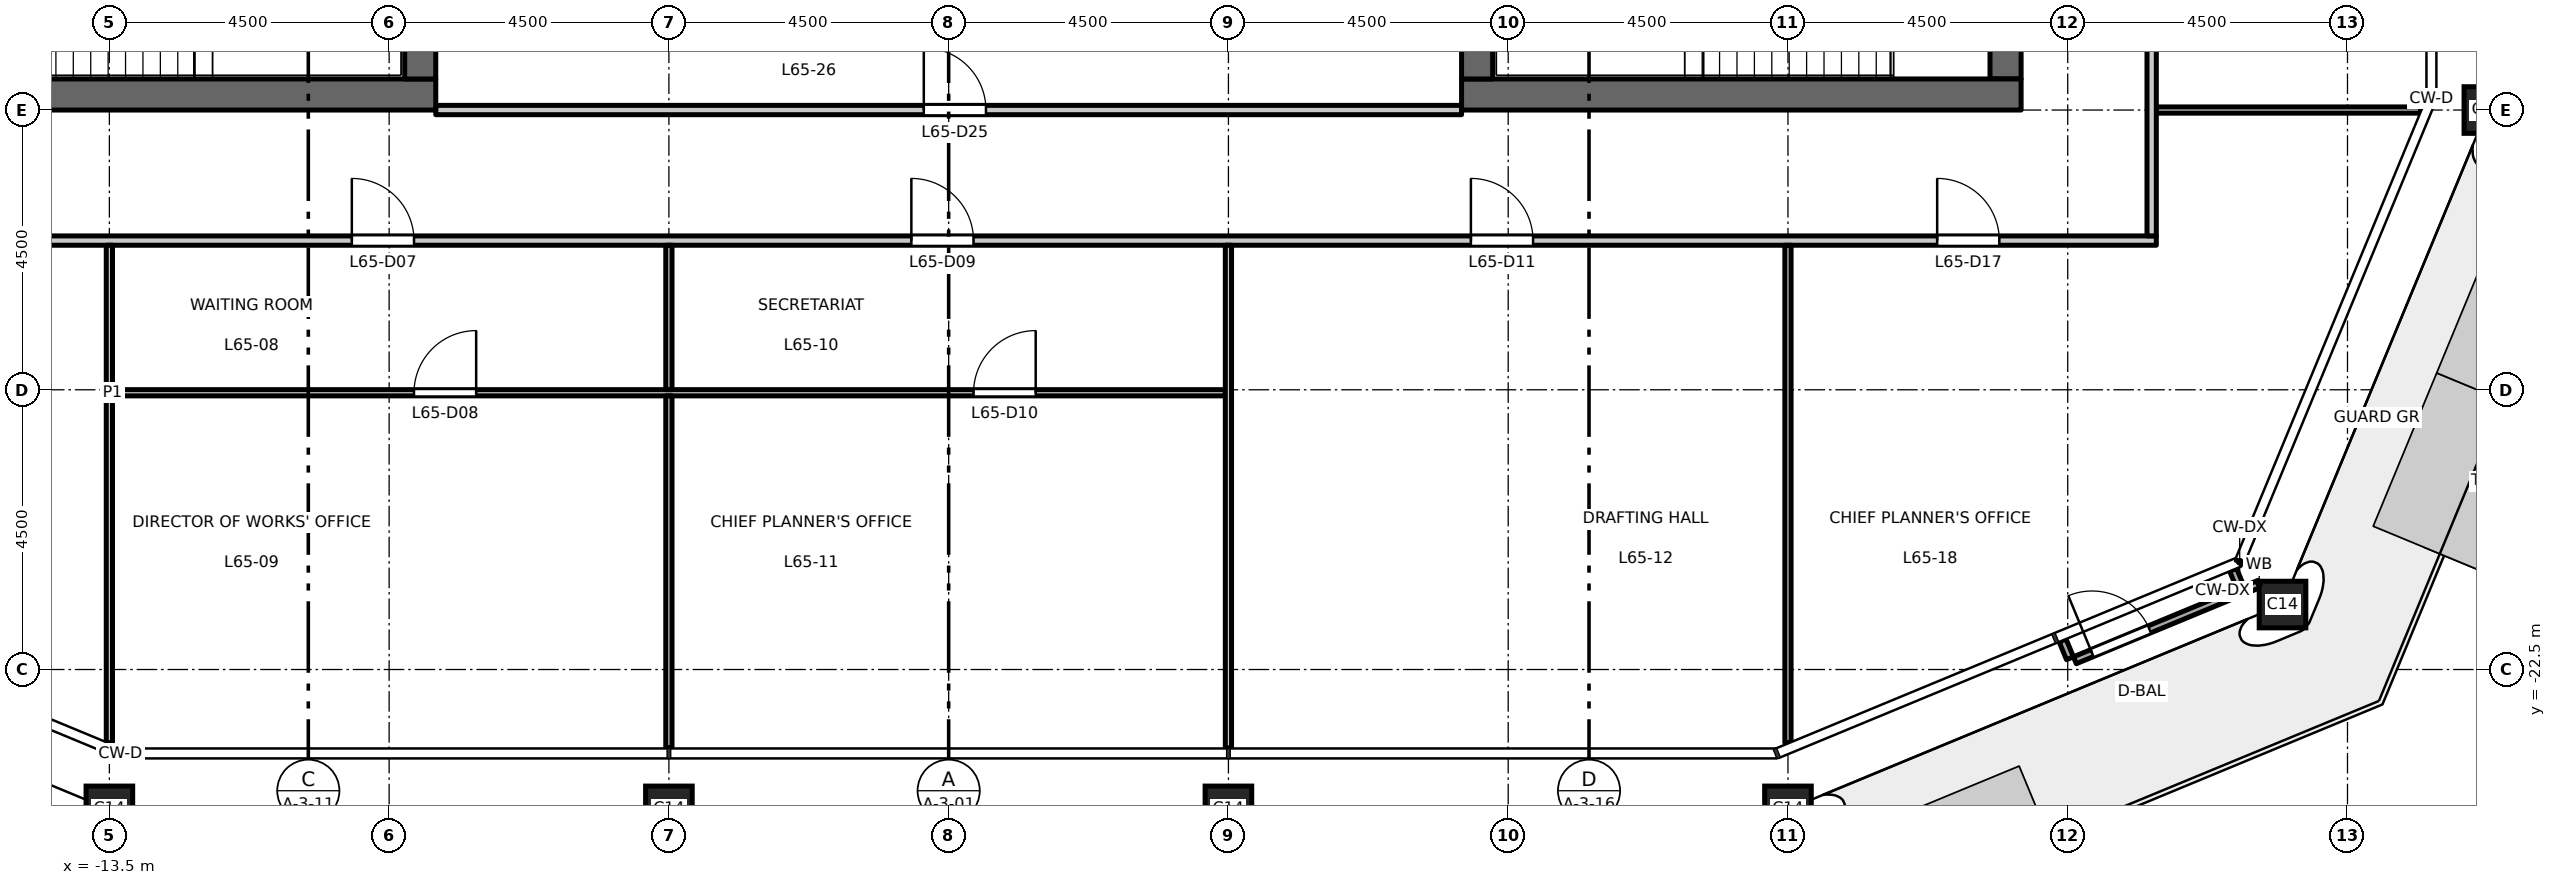
"""IFC4 building model, lengths in metres.
Left out: names, types, materials, properties, quantities, classifications, styles, units other than length and angle.
Written with IfcOpenShell. Run it as: python <this file> out.ifc"""

import sys

from ifc_helpers import new_model, si_unit, direction, frame, frame_2d, origin, origin_2d, place, context, subcontext, project, spatial, rectangle, hollow_rectangle, extrude, element, fill, save


model = new_model("IFC4")
c1 = context("Model", 3, precision=1e-05, world=origin(), true_north=direction((0.0, 1.0)))
c2 = subcontext(c1, "Body", "Model", "MODEL_VIEW")
j1 = project(units=[si_unit("LENGTHUNIT", "METRE"), si_unit("PLANEANGLEUNIT", "RADIAN")], contexts=[c1])
p1 = place(None, origin())
s1 = spatial("IfcSite", under=j1, at=p1, CompositionType="ELEMENT")
p2 = place(p1, origin())
s2 = spatial("IfcBuilding", under=s1, at=p2, CompositionType="ELEMENT")
p3 = place(p2, frame((0.0, 0.0, 303.2)))
s3 = spatial("IfcBuildingStorey", under=s2, at=p3, CompositionType="ELEMENT", Elevation=303.2)
for number, where, z_axis, x_axis in (
    (1, (-13.5, -24.75, 0.0), (0.0, 0.0, 1.0), (1.0, 0.0, 0.0)),
    (2, (-4.5, -24.75, 0.0), (0.0, 0.0, 1.0), (1.0, 0.0, 0.0)),
    (3, (4.5, -24.75, 0.0), (0.0, 0.0, 1.0), (1.0, 0.0, 0.0)),
    (4, (13.5, -24.75, 0.0), (0.0, 0.0, 1.0), (1.0, 0.0, 0.0)),
    (5, (21.455, -21.455, 0.0), (0.0, 0.0, 1.0), (1.0, 0.0, 0.0)),
    (6, (24.75, -13.5, 0.0), (0.0, 0.0, 1.0), (1.0, 0.0, 0.0)),
):
    element("IfcColumn", number, at=place(p3, frame(where, z_axis=z_axis, x_axis=x_axis)), inside=s3, PredefinedType="COLUMN", context=c2, shape_type="SweptSolid", body=[
        extrude(hollow_rectangle(XDim=0.75, YDim=0.75, WallThickness=0.04, at=origin_2d()), origin(), (0.0, 0.0, 1.0), 4.5),
    ])
p4 = place(p3, frame((-8.25, -13.25, 0.0), z_axis=(0.0, 0.0, 1.0), x_axis=(-1.0, 0.0, 0.0)))
e7 = element("IfcWall", 7, at=p4, inside=s3, PredefinedType="SHEAR", context=c2, shape_type="SweptSolid", body=[
    extrude(rectangle(XDim=9.0, YDim=0.5, at=frame_2d((4.5, 0.0))), origin(), (0.0, 0.0, 1.0), 4.35),
])
p5 = place(p3, frame((-8.5, -13.0, 0.0), z_axis=(0.0, 0.0, 1.0), x_axis=(0.0, 1.0, 0.0)))
e8 = element("IfcWall", 8, at=p5, inside=s3, PredefinedType="SHEAR", context=c2, shape_type="SweptSolid", body=[
    extrude(rectangle(XDim=26.0, YDim=0.5, at=frame_2d((13.0, 0.0))), origin(), (0.0, 0.0, 1.0), 4.35),
])
p6 = place(p3, frame((17.0, -13.0, 0.0), z_axis=(0.0, 0.0, 1.0), x_axis=(0.0, 1.0, 0.0)))
e9 = element("IfcWall", 9, at=p6, inside=s3, PredefinedType="SHEAR", context=c2, shape_type="SweptSolid", body=[
    extrude(rectangle(XDim=26.0, YDim=0.5, at=frame_2d((13.0, 0.0))), origin(), (0.0, 0.0, 1.0), 4.35),
])
p7 = place(p6, frame((16.825, 0.0, 0.0)))
e10 = element("IfcOpeningElement", 10, at=p7, cuts=e9, PredefinedType="OPENING", context=c2, shape_type="SweptSolid", body=[
    extrude(rectangle(XDim=1.8, YDim=2.1, at=frame_2d((0.9, 1.05))), frame((0.0, 0.26, 0.0), z_axis=(0.0, -1.0, 0.0), x_axis=(1.0, 0.0, 0.0)), (0.0, 0.0, 1.0), 0.52),
])
p8 = place(p6, frame((7.375, 0.0, 0.0)))
e11 = element("IfcOpeningElement", 11, at=p8, cuts=e9, PredefinedType="OPENING", context=c2, shape_type="SweptSolid", body=[
    extrude(rectangle(XDim=1.8, YDim=2.1, at=frame_2d((0.9, 1.05))), frame((0.0, 0.26, 0.0), z_axis=(0.0, -1.0, 0.0), x_axis=(1.0, 0.0, 0.0)), (0.0, 0.0, 1.0), 0.52),
])
p9 = place(p3, frame((8.25, -13.25, 0.0), z_axis=(0.0, 0.0, 1.0), x_axis=(1.0, 0.0, 0.0)))
e12 = element("IfcWall", 12, at=p9, inside=s3, PredefinedType="SHEAR", context=c2, shape_type="SweptSolid", body=[
    extrude(rectangle(XDim=9.0, YDim=0.5, at=frame_2d((4.5, 0.0))), origin(), (0.0, 0.0, 1.0), 4.35),
])
p10 = place(p3, frame((8.5, -13.0, 0.0), z_axis=(0.0, 0.0, 1.0), x_axis=(0.0, 1.0, 0.0)))
e13 = element("IfcWall", 13, at=p10, inside=s3, PredefinedType="SHEAR", context=c2, shape_type="SweptSolid", body=[
    extrude(rectangle(XDim=26.0, YDim=0.5, at=frame_2d((13.0, 0.0))), origin(), (0.0, 0.0, 1.0), 4.35),
])
p11 = place(p3, frame((17.917, -22.033, 0.0), z_axis=(0.0, 0.0, 1.0), x_axis=(0.382769136873, -0.923844027884, 0.0)))
e14 = element("IfcWall", 14, at=p11, inside=s3, PredefinedType="STANDARD", context=c2, shape_type="SweptSolid", body=[
    extrude(rectangle(XDim=0.31, YDim=0.12, at=frame_2d((0.155, 0.0))), origin(), (0.0, 0.0, 1.0), 4.35),
])
p12 = place(p3, frame((20.66, -20.896, 0.0), z_axis=(0.0, 0.0, 1.0), x_axis=(0.382490814953, -0.923959293734, 0.0)))
e15 = element("IfcWall", 15, at=p12, inside=s3, PredefinedType="STANDARD", context=c2, shape_type="SweptSolid", body=[
    extrude(rectangle(XDim=0.31, YDim=0.12, at=frame_2d((0.155, 0.0))), origin(), (0.0, 0.0, 1.0), 4.35),
])
p13 = place(p3, frame((18.115, -22.352, 0.0), z_axis=(0.0, 0.0, 1.0), x_axis=(0.923880552517, 0.382680969843, 0.0)))
e16 = element("IfcWall", 16, at=p13, inside=s3, PredefinedType="STANDARD", context=c2, shape_type="SweptSolid", body=[
    extrude(rectangle(XDim=3.21, YDim=0.12, at=frame_2d((1.605, 0.0))), origin(), (0.0, 0.0, 1.0), 4.35),
])
p14 = place(p13, frame((0.3, 0.0, 0.0)))
e17 = element("IfcOpeningElement", 17, at=p14, cuts=e16, PredefinedType="OPENING", context=c2, shape_type="SweptSolid", body=[
    extrude(rectangle(XDim=1.0, YDim=2.4, at=frame_2d((0.5, 1.2))), frame((0.0, 0.07, 0.0), z_axis=(0.0, -1.0, 0.0), x_axis=(1.0, 0.0, 0.0)), (0.0, 0.0, 1.0), 0.14),
])
p15 = place(p3, frame((-13.45, -18.048, 0.0), z_axis=(0.0, 0.0, 1.0), x_axis=(1.0, 0.0, 0.0)))
e18 = element("IfcWall", 18, at=p15, inside=s3, PredefinedType="PARTITIONING", context=c2, shape_type="SweptSolid", body=[
    extrude(rectangle(XDim=17.9, YDim=0.1, at=frame_2d((8.95, 0.0))), origin(), (0.0, 0.0, 1.0), 3.99),
])
p16 = place(p15, frame((4.85, 0.0, 0.0)))
e19 = element("IfcOpeningElement", 19, at=p16, cuts=e18, PredefinedType="OPENING", context=c2, shape_type="SweptSolid", body=[
    extrude(rectangle(XDim=1.0, YDim=2.1, at=frame_2d((0.5, 1.05))), frame((0.0, 0.06, 0.0), z_axis=(0.0, -1.0, 0.0), x_axis=(1.0, 0.0, 0.0)), (0.0, 0.0, 1.0), 0.12),
])
p17 = place(p15, frame((13.85, 0.0, 0.0)))
e20 = element("IfcOpeningElement", 20, at=p17, cuts=e18, PredefinedType="OPENING", context=c2, shape_type="SweptSolid", body=[
    extrude(rectangle(XDim=1.0, YDim=2.1, at=frame_2d((0.5, 1.05))), frame((0.0, 0.06, 0.0), z_axis=(0.0, -1.0, 0.0), x_axis=(1.0, 0.0, 0.0)), (0.0, 0.0, 1.0), 0.12),
])
p18 = place(p3, frame((-19.425, -15.6, 0.0), z_axis=(0.0, 0.0, 1.0), x_axis=(1.0, 0.0, 0.0)))
e21 = element("IfcWall", 21, at=p18, inside=s3, PredefinedType="PARTITIONING", context=c2, shape_type="SweptSolid", body=[
    extrude(rectangle(XDim=38.85, YDim=0.15, at=frame_2d((19.425, 0.0))), origin(), (0.0, 0.0, 1.0), 4.35),
])
p19 = place(p18, frame((9.825, 0.0, 0.0)))
e22 = element("IfcOpeningElement", 22, at=p19, cuts=e21, PredefinedType="OPENING", context=c2, shape_type="SweptSolid", body=[
    extrude(rectangle(XDim=1.0, YDim=2.1, at=frame_2d((0.5, 1.05))), frame((0.0, 0.085, 0.0), z_axis=(0.0, -1.0, 0.0), x_axis=(1.0, 0.0, 0.0)), (0.0, 0.0, 1.0), 0.17),
])
p20 = place(p18, frame((18.825, 0.0, 0.0)))
e23 = element("IfcOpeningElement", 23, at=p20, cuts=e21, PredefinedType="OPENING", context=c2, shape_type="SweptSolid", body=[
    extrude(rectangle(XDim=1.0, YDim=2.1, at=frame_2d((0.5, 1.05))), frame((0.0, 0.085, 0.0), z_axis=(0.0, -1.0, 0.0), x_axis=(1.0, 0.0, 0.0)), (0.0, 0.0, 1.0), 0.17),
])
p21 = place(p18, frame((27.825, 0.0, 0.0)))
e24 = element("IfcOpeningElement", 24, at=p21, cuts=e21, PredefinedType="OPENING", context=c2, shape_type="SweptSolid", body=[
    extrude(rectangle(XDim=1.0, YDim=2.1, at=frame_2d((0.5, 1.05))), frame((0.0, 0.085, 0.0), z_axis=(0.0, -1.0, 0.0), x_axis=(1.0, 0.0, 0.0)), (0.0, 0.0, 1.0), 0.17),
])
p22 = place(p18, frame((2.475, 0.0, 0.0)))
e25 = element("IfcOpeningElement", 25, at=p22, cuts=e21, PredefinedType="OPENING", context=c2, shape_type="SweptSolid", body=[
    extrude(rectangle(XDim=1.0, YDim=2.1, at=frame_2d((0.5, 1.05))), frame((0.0, 0.085, 0.0), z_axis=(0.0, -1.0, 0.0), x_axis=(1.0, 0.0, 0.0)), (0.0, 0.0, 1.0), 0.17),
])
p23 = place(p18, frame((35.325, 0.0, 0.0)))
e26 = element("IfcOpeningElement", 26, at=p23, cuts=e21, PredefinedType="OPENING", context=c2, shape_type="SweptSolid", body=[
    extrude(rectangle(XDim=1.0, YDim=2.1, at=frame_2d((0.5, 1.05))), frame((0.0, 0.085, 0.0), z_axis=(0.0, -1.0, 0.0), x_axis=(1.0, 0.0, 0.0)), (0.0, 0.0, 1.0), 0.17),
])
p24 = place(p3, frame((19.425, -13.5, 0.0), z_axis=(0.0, 0.0, 1.0), x_axis=(1.0, 0.0, 0.0)))
e27 = element("IfcWall", 27, at=p24, inside=s3, PredefinedType="PARTITIONING", context=c2, shape_type="SweptSolid", body=[
    extrude(rectangle(XDim=4.253, YDim=0.1, at=frame_2d((2.126, 0.0))), origin(), (0.0, 0.0, 1.0), 4.35),
])
p25 = place(p3, frame((-8.25, -13.5, 0.0), z_axis=(0.0, 0.0, 1.0), x_axis=(1.0, 0.0, 0.0)))
e28 = element("IfcWall", 28, at=p25, inside=s3, PredefinedType="PARTITIONING", context=c2, shape_type="SweptSolid", body=[
    extrude(rectangle(XDim=16.5, YDim=0.15, at=frame_2d((8.25, 0.0))), origin(), (0.0, 0.0, 1.0), 4.35),
])
p26 = place(p25, frame((7.85, 0.0, 0.0)))
e29 = element("IfcOpeningElement", 29, at=p26, cuts=e28, PredefinedType="OPENING", context=c2, shape_type="SweptSolid", body=[
    extrude(rectangle(XDim=1.0, YDim=2.1, at=frame_2d((0.5, 1.05))), frame((0.0, 0.085, 0.0), z_axis=(0.0, -1.0, 0.0), x_axis=(1.0, 0.0, 0.0)), (0.0, 0.0, 1.0), 0.17),
])
p27 = place(p3, frame((-13.5, -23.678, 0.0), z_axis=(0.0, 0.0, 1.0), x_axis=(0.0, 1.0, 0.0)))
e30 = element("IfcWall", 30, at=p27, inside=s3, PredefinedType="PARTITIONING", context=c2, shape_type="SweptSolid", body=[
    extrude(rectangle(XDim=8.003, YDim=0.1, at=frame_2d((4.001, 0.0))), origin(), (0.0, 0.0, 1.0), 3.75),
])
p28 = place(p3, frame((-4.5, -23.76, 0.0), z_axis=(0.0, 0.0, 1.0), x_axis=(0.0, 1.0, 0.0)))
e31 = element("IfcWall", 31, at=p28, inside=s3, PredefinedType="PARTITIONING", context=c2, shape_type="SweptSolid", body=[
    extrude(rectangle(XDim=5.662, YDim=0.1, at=frame_2d((2.831, 0.0))), origin(), (0.0, 0.0, 1.0), 3.65),
])
p29 = place(p3, frame((-4.5, -17.998, 0.0), z_axis=(0.0, 0.0, 1.0), x_axis=(0.0, 1.0, 0.0)))
e32 = element("IfcWall", 32, at=p29, inside=s3, PredefinedType="PARTITIONING", context=c2, shape_type="SweptSolid", body=[
    extrude(rectangle(XDim=2.323, YDim=0.1, at=frame_2d((1.162, 0.0))), origin(), (0.0, 0.0, 1.0), 3.65),
])
p30 = place(p3, frame((4.5, -23.76, 0.0), z_axis=(0.0, 0.0, 1.0), x_axis=(0.0, 1.0, 0.0)))
e33 = element("IfcWall", 33, at=p30, inside=s3, PredefinedType="PARTITIONING", context=c2, shape_type="SweptSolid", body=[
    extrude(rectangle(XDim=8.085, YDim=0.1, at=frame_2d((4.042, 0.0))), origin(), (0.0, 0.0, 1.0), 3.65),
])
p31 = place(p3, frame((13.5, -23.678, 0.0), z_axis=(0.0, 0.0, 1.0), x_axis=(0.0, 1.0, 0.0)))
e34 = element("IfcWall", 34, at=p31, inside=s3, PredefinedType="PARTITIONING", context=c2, shape_type="SweptSolid", body=[
    extrude(rectangle(XDim=8.003, YDim=0.1, at=frame_2d((4.001, 0.0))), origin(), (0.0, 0.0, 1.0), 3.75),
])
p32 = place(p3, frame((19.35, -15.525, 0.0), z_axis=(0.0, 0.0, 1.0), x_axis=(0.0, 1.0, 0.0)))
e35 = element("IfcWall", 35, at=p32, inside=s3, PredefinedType="PARTITIONING", context=c2, shape_type="SweptSolid", body=[
    extrude(rectangle(XDim=31.05, YDim=0.15, at=frame_2d((15.525, 0.0))), origin(), (0.0, 0.0, 1.0), 4.35),
])
p33 = place(p32, frame((29.675, 0.0, 0.0)))
e36 = element("IfcOpeningElement", 36, at=p33, cuts=e35, PredefinedType="OPENING", context=c2, shape_type="SweptSolid", body=[
    extrude(rectangle(XDim=1.0, YDim=2.1, at=frame_2d((0.5, 1.05))), frame((0.0, 0.085, 0.0), z_axis=(0.0, -1.0, 0.0), x_axis=(1.0, 0.0, 0.0)), (0.0, 0.0, 1.0), 0.17),
])
p34 = place(p32, frame((5.925, 0.0, 0.0)))
e37 = element("IfcOpeningElement", 37, at=p34, cuts=e35, PredefinedType="OPENING", context=c2, shape_type="SweptSolid", body=[
    extrude(rectangle(XDim=1.0, YDim=2.1, at=frame_2d((0.5, 1.05))), frame((0.0, 0.085, 0.0), z_axis=(0.0, -1.0, 0.0), x_axis=(1.0, 0.0, 0.0)), (0.0, 0.0, 1.0), 0.17),
])
p35 = place(p32, frame((14.925, 0.0, 0.0)))
e38 = element("IfcOpeningElement", 38, at=p35, cuts=e35, PredefinedType="OPENING", context=c2, shape_type="SweptSolid", body=[
    extrude(rectangle(XDim=1.0, YDim=2.1, at=frame_2d((0.5, 1.05))), frame((0.0, 0.085, 0.0), z_axis=(0.0, -1.0, 0.0), x_axis=(1.0, 0.0, 0.0)), (0.0, 0.0, 1.0), 0.17),
])
p36 = place(p32, frame((23.925, 0.0, 0.0)))
e39 = element("IfcOpeningElement", 39, at=p36, cuts=e35, PredefinedType="OPENING", context=c2, shape_type="SweptSolid", body=[
    extrude(rectangle(XDim=1.0, YDim=2.1, at=frame_2d((0.5, 1.05))), frame((0.0, 0.085, 0.0), z_axis=(0.0, -1.0, 0.0), x_axis=(1.0, 0.0, 0.0)), (0.0, 0.0, 1.0), 0.17),
])
p37 = place(p14, origin())
e40 = element("IfcDoor", 40, at=p37, inside=s3, OperationType="SINGLE_SWING_LEFT", PredefinedType="DOOR", context=c2, shape_type="SweptSolid", body=[
    extrude(rectangle(XDim=1.0, YDim=2.4, at=frame_2d((0.5, 1.2))), frame((0.0, 0.025, 0.0), z_axis=(0.0, -1.0, 0.0), x_axis=(1.0, 0.0, 0.0)), (0.0, 0.0, 1.0), 0.05),
])
fill(e17, e40)
p38 = place(p19, origin())
e41 = element("IfcDoor", 41, at=p38, inside=s3, OperationType="SINGLE_SWING_LEFT", PredefinedType="DOOR", context=c2, shape_type="SweptSolid", body=[
    extrude(rectangle(XDim=1.0, YDim=2.1, at=frame_2d((0.5, 1.05))), frame((0.0, 0.025, 0.0), z_axis=(0.0, -1.0, 0.0), x_axis=(1.0, 0.0, 0.0)), (0.0, 0.0, 1.0), 0.05),
])
fill(e22, e41)
p39 = place(p16, origin())
e42 = element("IfcDoor", 42, at=p39, inside=s3, OperationType="SINGLE_SWING_RIGHT", PredefinedType="DOOR", context=c2, shape_type="SweptSolid", body=[
    extrude(rectangle(XDim=1.0, YDim=2.1, at=frame_2d((0.5, 1.05))), frame((0.0, 0.025, 0.0), z_axis=(0.0, -1.0, 0.0), x_axis=(1.0, 0.0, 0.0)), (0.0, 0.0, 1.0), 0.05),
])
fill(e19, e42)
p40 = place(p20, origin())
e43 = element("IfcDoor", 43, at=p40, inside=s3, OperationType="SINGLE_SWING_LEFT", PredefinedType="DOOR", context=c2, shape_type="SweptSolid", body=[
    extrude(rectangle(XDim=1.0, YDim=2.1, at=frame_2d((0.5, 1.05))), frame((0.0, 0.025, 0.0), z_axis=(0.0, -1.0, 0.0), x_axis=(1.0, 0.0, 0.0)), (0.0, 0.0, 1.0), 0.05),
])
fill(e23, e43)
p41 = place(p17, origin())
e44 = element("IfcDoor", 44, at=p41, inside=s3, OperationType="SINGLE_SWING_RIGHT", PredefinedType="DOOR", context=c2, shape_type="SweptSolid", body=[
    extrude(rectangle(XDim=1.0, YDim=2.1, at=frame_2d((0.5, 1.05))), frame((0.0, 0.025, 0.0), z_axis=(0.0, -1.0, 0.0), x_axis=(1.0, 0.0, 0.0)), (0.0, 0.0, 1.0), 0.05),
])
fill(e20, e44)
p42 = place(p21, origin())
e45 = element("IfcDoor", 45, at=p42, inside=s3, OperationType="SINGLE_SWING_LEFT", PredefinedType="DOOR", context=c2, shape_type="SweptSolid", body=[
    extrude(rectangle(XDim=1.0, YDim=2.1, at=frame_2d((0.5, 1.05))), frame((0.0, 0.025, 0.0), z_axis=(0.0, -1.0, 0.0), x_axis=(1.0, 0.0, 0.0)), (0.0, 0.0, 1.0), 0.05),
])
fill(e24, e45)
p43 = place(p23, origin())
e46 = element("IfcDoor", 46, at=p43, inside=s3, OperationType="SINGLE_SWING_LEFT", PredefinedType="DOOR", context=c2, shape_type="SweptSolid", body=[
    extrude(rectangle(XDim=1.0, YDim=2.1, at=frame_2d((0.5, 1.05))), frame((0.0, 0.025, 0.0), z_axis=(0.0, -1.0, 0.0), x_axis=(1.0, 0.0, 0.0)), (0.0, 0.0, 1.0), 0.05),
])
fill(e26, e46)
p44 = place(p26, origin())
e47 = element("IfcDoor", 47, at=p44, inside=s3, OperationType="SINGLE_SWING_LEFT", PredefinedType="DOOR", context=c2, shape_type="SweptSolid", body=[
    extrude(rectangle(XDim=1.0, YDim=2.1, at=frame_2d((0.5, 1.05))), frame((0.0, 0.025, 0.0), z_axis=(0.0, -1.0, 0.0), x_axis=(1.0, 0.0, 0.0)), (0.0, 0.0, 1.0), 0.05),
])
fill(e29, e47)
save(model, sys.argv[1])
